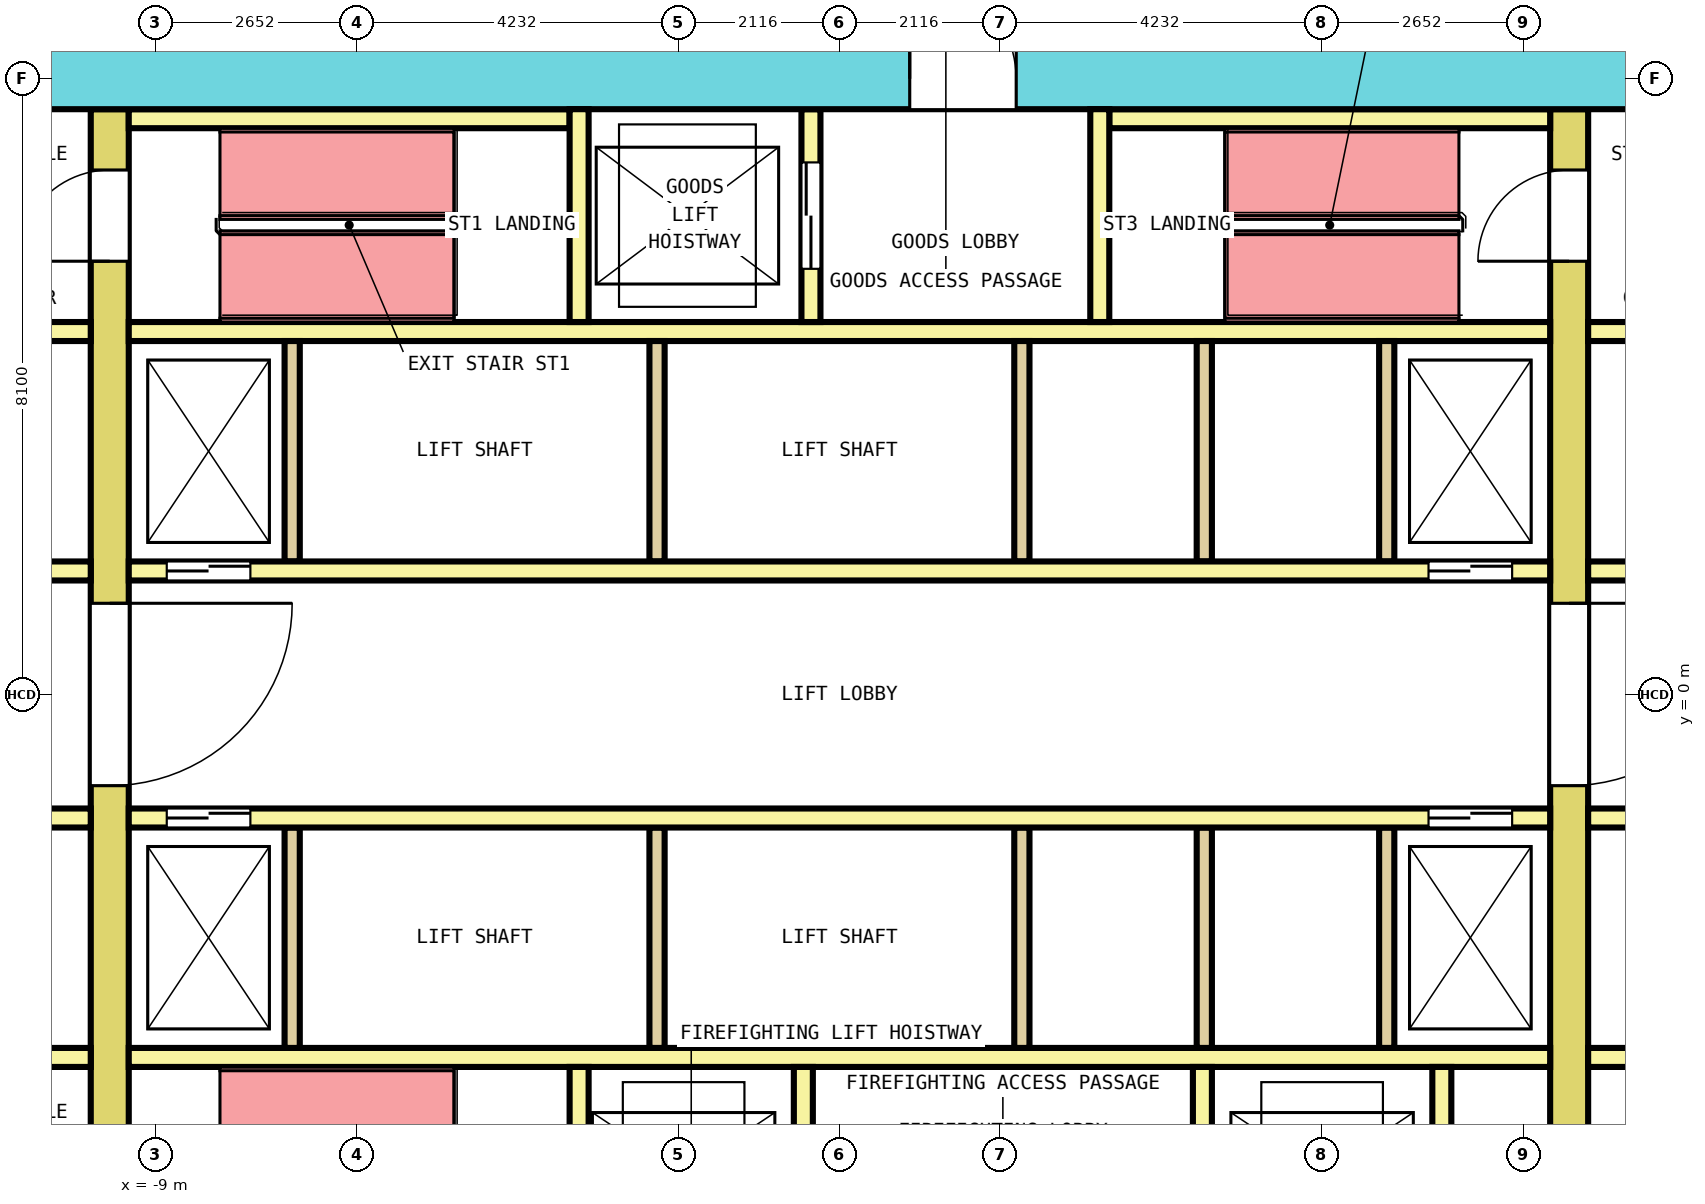
"""IFC4 building model, lengths in metres.
Left out: names, types, materials, properties, quantities, classifications, styles, units other than length and angle.
Written with IfcOpenShell. Run it as: python <this file> out.ifc"""

import sys

from ifc_helpers import new_model, si_unit, direction, frame, frame_2d, origin, place, context, subcontext, project, spatial, rectangle, extrude, element, fill, save


model = new_model("IFC4")
c1 = context("Model", 3, precision=1e-05, world=origin(), true_north=direction((0.0, 1.0)))
c2 = subcontext(c1, "Body", "Model", "MODEL_VIEW")
j1 = project(units=[si_unit("LENGTHUNIT", "METRE"), si_unit("PLANEANGLEUNIT", "RADIAN")], contexts=[c1])
p1 = place(None, origin())
s1 = spatial("IfcSite", under=j1, at=p1, CompositionType="ELEMENT")
p2 = place(p1, origin())
s2 = spatial("IfcBuilding", under=s1, at=p2, CompositionType="ELEMENT")
p3 = place(p2, frame((0.0, 0.0, 23.4)))
s3 = spatial("IfcBuildingStorey", under=s2, at=p3, CompositionType="ELEMENT", Elevation=23.4)
p4 = place(p3, frame((-12.75, 8.1, 0.0), z_axis=(0.0, 0.0, 1.0), x_axis=(1.0, 0.0, 0.0)))
e1 = element("IfcWall", 1, at=p4, inside=s3, PredefinedType="SHEAR", context=c2, shape_type="SweptSolid", body=[
    extrude(rectangle(XDim=25.5, YDim=0.8, at=frame_2d((12.75, 0.0))), origin(), (0.0, 0.0, 1.0), 4.1),
])
p5 = place(p4, frame((13.675, 0.0, 0.0)))
e2 = element("IfcOpeningElement", 2, at=p5, cuts=e1, PredefinedType="OPENING", context=c2, shape_type="SweptSolid", body=[
    extrude(rectangle(XDim=1.4, YDim=2.1, at=frame_2d((0.7, 1.05))), frame((0.0, 0.41, 0.0), z_axis=(0.0, -1.0, 0.0), x_axis=(1.0, 0.0, 0.0)), (0.0, 0.0, 1.0), 0.82),
])
p6 = place(p3, frame((-9.6, -7.7, 0.0), z_axis=(0.0, 0.0, 1.0), x_axis=(0.0, 1.0, 0.0)))
e3 = element("IfcWall", 3, at=p6, inside=s3, PredefinedType="SHEAR", context=c2, shape_type="SweptSolid", body=[
    extrude(rectangle(XDim=15.4, YDim=0.5, at=frame_2d((7.7, 0.0))), origin(), (0.0, 0.0, 1.0), 4.1),
])
p7 = place(p6, frame((6.5, 0.0, 0.0)))
e4 = element("IfcOpeningElement", 4, at=p7, cuts=e3, PredefinedType="OPENING", context=c2, shape_type="SweptSolid", body=[
    extrude(rectangle(XDim=2.4, YDim=2.1, at=frame_2d((1.2, 1.05))), frame((0.0, 0.26, 0.0), z_axis=(0.0, -1.0, 0.0), x_axis=(1.0, 0.0, 0.0)), (0.0, 0.0, 1.0), 0.52),
])
p8 = place(p6, frame((13.4, 0.0, 0.0)))
e5 = element("IfcOpeningElement", 5, at=p8, cuts=e3, PredefinedType="OPENING", context=c2, shape_type="SweptSolid", body=[
    extrude(rectangle(XDim=1.2, YDim=2.1, at=frame_2d((0.6, 1.05))), frame((0.0, 0.26, 0.0), z_axis=(0.0, -1.0, 0.0), x_axis=(1.0, 0.0, 0.0)), (0.0, 0.0, 1.0), 0.52),
])
p9 = place(p6, frame((0.8, 0.0, 0.0)))
e6 = element("IfcOpeningElement", 6, at=p9, cuts=e3, PredefinedType="OPENING", context=c2, shape_type="SweptSolid", body=[
    extrude(rectangle(XDim=1.2, YDim=2.1, at=frame_2d((0.6, 1.05))), frame((0.0, 0.26, 0.0), z_axis=(0.0, -1.0, 0.0), x_axis=(1.0, 0.0, 0.0)), (0.0, 0.0, 1.0), 0.52),
])
p10 = place(p3, frame((9.6, -7.7, 0.0), z_axis=(0.0, 0.0, 1.0), x_axis=(0.0, 1.0, 0.0)))
e7 = element("IfcWall", 7, at=p10, inside=s3, PredefinedType="SHEAR", context=c2, shape_type="SweptSolid", body=[
    extrude(rectangle(XDim=15.4, YDim=0.5, at=frame_2d((7.7, 0.0))), origin(), (0.0, 0.0, 1.0), 4.1),
])
p11 = place(p10, frame((6.5, 0.0, 0.0)))
e8 = element("IfcOpeningElement", 8, at=p11, cuts=e7, PredefinedType="OPENING", context=c2, shape_type="SweptSolid", body=[
    extrude(rectangle(XDim=2.4, YDim=2.1, at=frame_2d((1.2, 1.05))), frame((0.0, 0.26, 0.0), z_axis=(0.0, -1.0, 0.0), x_axis=(1.0, 0.0, 0.0)), (0.0, 0.0, 1.0), 0.52),
])
p12 = place(p10, frame((13.4, 0.0, 0.0)))
e9 = element("IfcOpeningElement", 9, at=p12, cuts=e7, PredefinedType="OPENING", context=c2, shape_type="SweptSolid", body=[
    extrude(rectangle(XDim=1.2, YDim=2.1, at=frame_2d((0.6, 1.05))), frame((0.0, 0.26, 0.0), z_axis=(0.0, -1.0, 0.0), x_axis=(1.0, 0.0, 0.0)), (0.0, 0.0, 1.0), 0.52),
])
p13 = place(p10, frame((0.9, 0.0, 0.0)))
e10 = element("IfcOpeningElement", 10, at=p13, cuts=e7, PredefinedType="OPENING", context=c2, shape_type="SweptSolid", body=[
    extrude(rectangle(XDim=1.0, YDim=2.1, at=frame_2d((0.5, 1.05))), frame((0.0, 0.26, 0.0), z_axis=(0.0, -1.0, 0.0), x_axis=(1.0, 0.0, 0.0)), (0.0, 0.0, 1.0), 0.52),
])
p14 = place(p3, frame((-12.75, 1.625, 0.0), z_axis=(0.0, 0.0, 1.0), x_axis=(1.0, 0.0, 0.0)))
e11 = element("IfcWall", 11, at=p14, inside=s3, PredefinedType="SOLIDWALL", context=c2, shape_type="SweptSolid", body=[
    extrude(rectangle(XDim=2.9, YDim=0.25, at=frame_2d((1.45, 0.0))), origin(), (0.0, 0.0, 1.0), 4.1),
])
p15 = place(p14, frame((0.9, 0.0, 0.0)))
e12 = element("IfcOpeningElement", 12, at=p15, cuts=e11, PredefinedType="OPENING", context=c2, shape_type="SweptSolid", body=[
    extrude(rectangle(XDim=1.1, YDim=2.1, at=frame_2d((0.55, 1.05))), frame((0.0, 0.135, 0.0), z_axis=(0.0, -1.0, 0.0), x_axis=(1.0, 0.0, 0.0)), (0.0, 0.0, 1.0), 0.27),
])
p16 = place(p3, frame((-9.35, 1.625, 0.0), z_axis=(0.0, 0.0, 1.0), x_axis=(1.0, 0.0, 0.0)))
e13 = element("IfcWall", 13, at=p16, inside=s3, PredefinedType="SOLIDWALL", context=c2, shape_type="SweptSolid", body=[
    extrude(rectangle(XDim=18.7, YDim=0.25, at=frame_2d((9.35, 0.0))), origin(), (0.0, 0.0, 1.0), 4.1),
])
p17 = place(p16, frame((0.5, 0.0, 0.0)))
e14 = element("IfcOpeningElement", 14, at=p17, cuts=e13, PredefinedType="OPENING", context=c2, shape_type="SweptSolid", body=[
    extrude(rectangle(XDim=1.1, YDim=2.1, at=frame_2d((0.55, 1.05))), frame((0.0, 0.135, 0.0), z_axis=(0.0, -1.0, 0.0), x_axis=(1.0, 0.0, 0.0)), (0.0, 0.0, 1.0), 0.27),
])
p18 = place(p16, frame((17.1, 0.0, 0.0)))
e15 = element("IfcOpeningElement", 15, at=p18, cuts=e13, PredefinedType="OPENING", context=c2, shape_type="SweptSolid", body=[
    extrude(rectangle(XDim=1.1, YDim=2.1, at=frame_2d((0.55, 1.05))), frame((0.0, 0.135, 0.0), z_axis=(0.0, -1.0, 0.0), x_axis=(1.0, 0.0, 0.0)), (0.0, 0.0, 1.0), 0.27),
])
p19 = place(p3, frame((9.85, 1.625, 0.0), z_axis=(0.0, 0.0, 1.0), x_axis=(1.0, 0.0, 0.0)))
e16 = element("IfcWall", 16, at=p19, inside=s3, PredefinedType="SOLIDWALL", context=c2, shape_type="SweptSolid", body=[
    extrude(rectangle(XDim=2.9, YDim=0.25, at=frame_2d((1.45, 0.0))), origin(), (0.0, 0.0, 1.0), 4.1),
])
p20 = place(p19, frame((0.9, 0.0, 0.0)))
e17 = element("IfcOpeningElement", 17, at=p20, cuts=e16, PredefinedType="OPENING", context=c2, shape_type="SweptSolid", body=[
    extrude(rectangle(XDim=1.1, YDim=2.1, at=frame_2d((0.55, 1.05))), frame((0.0, 0.135, 0.0), z_axis=(0.0, -1.0, 0.0), x_axis=(1.0, 0.0, 0.0)), (0.0, 0.0, 1.0), 0.27),
])
p21 = place(p3, frame((-12.75, 4.775, 0.0), z_axis=(0.0, 0.0, 1.0), x_axis=(1.0, 0.0, 0.0)))
e18 = element("IfcWall", 18, at=p21, inside=s3, PredefinedType="SOLIDWALL", context=c2, shape_type="SweptSolid", body=[
    extrude(rectangle(XDim=2.9, YDim=0.25, at=frame_2d((1.45, 0.0))), origin(), (0.0, 0.0, 1.0), 4.1),
])
p22 = place(p3, frame((-9.35, 4.775, 0.0), z_axis=(0.0, 0.0, 1.0), x_axis=(1.0, 0.0, 0.0)))
e19 = element("IfcWall", 19, at=p22, inside=s3, PredefinedType="SOLIDWALL", context=c2, shape_type="SweptSolid", body=[
    extrude(rectangle(XDim=18.7, YDim=0.25, at=frame_2d((9.35, 0.0))), origin(), (0.0, 0.0, 1.0), 4.1),
])
p23 = place(p3, frame((9.85, 4.775, 0.0), z_axis=(0.0, 0.0, 1.0), x_axis=(1.0, 0.0, 0.0)))
e20 = element("IfcWall", 20, at=p23, inside=s3, PredefinedType="SOLIDWALL", context=c2, shape_type="SweptSolid", body=[
    extrude(rectangle(XDim=2.9, YDim=0.25, at=frame_2d((1.45, 0.0))), origin(), (0.0, 0.0, 1.0), 4.1),
])
for number, where, z_axis, x_axis in (
    (21, (-7.2, 1.75, 0.0), (0.0, 0.0, 1.0), (0.0, 1.0, 0.0)),
    (22, (-2.4, 1.75, 0.0), (0.0, 0.0, 1.0), (0.0, 1.0, 0.0)),
    (23, (2.4, 1.75, 0.0), (0.0, 0.0, 1.0), (0.0, 1.0, 0.0)),
    (24, (4.8, 1.75, 0.0), (0.0, 0.0, 1.0), (0.0, 1.0, 0.0)),
    (25, (7.2, 1.75, 0.0), (0.0, 0.0, 1.0), (0.0, 1.0, 0.0)),
):
    element("IfcWall", number, at=place(p3, frame(where, z_axis=z_axis, x_axis=x_axis)), inside=s3, PredefinedType="SOLIDWALL", context=c2, shape_type="SweptSolid", body=[
        extrude(rectangle(XDim=2.9, YDim=0.2, at=frame_2d((1.45, 0.0))), origin(), (0.0, 0.0, 1.0), 4.1),
    ])
p24 = place(p3, frame((-12.75, -1.625, 0.0), z_axis=(0.0, 0.0, 1.0), x_axis=(1.0, 0.0, 0.0)))
e26 = element("IfcWall", 26, at=p24, inside=s3, PredefinedType="SOLIDWALL", context=c2, shape_type="SweptSolid", body=[
    extrude(rectangle(XDim=2.9, YDim=0.25, at=frame_2d((1.45, 0.0))), origin(), (0.0, 0.0, 1.0), 4.1),
])
p25 = place(p24, frame((0.9, 0.0, 0.0)))
e27 = element("IfcOpeningElement", 27, at=p25, cuts=e26, PredefinedType="OPENING", context=c2, shape_type="SweptSolid", body=[
    extrude(rectangle(XDim=1.1, YDim=2.1, at=frame_2d((0.55, 1.05))), frame((0.0, 0.135, 0.0), z_axis=(0.0, -1.0, 0.0), x_axis=(1.0, 0.0, 0.0)), (0.0, 0.0, 1.0), 0.27),
])
p26 = place(p3, frame((-9.35, -1.625, 0.0), z_axis=(0.0, 0.0, 1.0), x_axis=(1.0, 0.0, 0.0)))
e28 = element("IfcWall", 28, at=p26, inside=s3, PredefinedType="SOLIDWALL", context=c2, shape_type="SweptSolid", body=[
    extrude(rectangle(XDim=18.7, YDim=0.25, at=frame_2d((9.35, 0.0))), origin(), (0.0, 0.0, 1.0), 4.1),
])
p27 = place(p26, frame((0.5, 0.0, 0.0)))
e29 = element("IfcOpeningElement", 29, at=p27, cuts=e28, PredefinedType="OPENING", context=c2, shape_type="SweptSolid", body=[
    extrude(rectangle(XDim=1.1, YDim=2.1, at=frame_2d((0.55, 1.05))), frame((0.0, 0.135, 0.0), z_axis=(0.0, -1.0, 0.0), x_axis=(1.0, 0.0, 0.0)), (0.0, 0.0, 1.0), 0.27),
])
p28 = place(p26, frame((17.1, 0.0, 0.0)))
e30 = element("IfcOpeningElement", 30, at=p28, cuts=e28, PredefinedType="OPENING", context=c2, shape_type="SweptSolid", body=[
    extrude(rectangle(XDim=1.1, YDim=2.1, at=frame_2d((0.55, 1.05))), frame((0.0, 0.135, 0.0), z_axis=(0.0, -1.0, 0.0), x_axis=(1.0, 0.0, 0.0)), (0.0, 0.0, 1.0), 0.27),
])
p29 = place(p3, frame((9.85, -1.625, 0.0), z_axis=(0.0, 0.0, 1.0), x_axis=(1.0, 0.0, 0.0)))
e31 = element("IfcWall", 31, at=p29, inside=s3, PredefinedType="SOLIDWALL", context=c2, shape_type="SweptSolid", body=[
    extrude(rectangle(XDim=2.9, YDim=0.25, at=frame_2d((1.45, 0.0))), origin(), (0.0, 0.0, 1.0), 4.1),
])
p30 = place(p29, frame((0.9, 0.0, 0.0)))
e32 = element("IfcOpeningElement", 32, at=p30, cuts=e31, PredefinedType="OPENING", context=c2, shape_type="SweptSolid", body=[
    extrude(rectangle(XDim=1.1, YDim=2.1, at=frame_2d((0.55, 1.05))), frame((0.0, 0.135, 0.0), z_axis=(0.0, -1.0, 0.0), x_axis=(1.0, 0.0, 0.0)), (0.0, 0.0, 1.0), 0.27),
])
p31 = place(p3, frame((-12.75, -4.775, 0.0), z_axis=(0.0, 0.0, 1.0), x_axis=(1.0, 0.0, 0.0)))
e33 = element("IfcWall", 33, at=p31, inside=s3, PredefinedType="SOLIDWALL", context=c2, shape_type="SweptSolid", body=[
    extrude(rectangle(XDim=2.9, YDim=0.25, at=frame_2d((1.45, 0.0))), origin(), (0.0, 0.0, 1.0), 4.1),
])
p32 = place(p3, frame((-9.35, -4.775, 0.0), z_axis=(0.0, 0.0, 1.0), x_axis=(1.0, 0.0, 0.0)))
e34 = element("IfcWall", 34, at=p32, inside=s3, PredefinedType="SOLIDWALL", context=c2, shape_type="SweptSolid", body=[
    extrude(rectangle(XDim=18.7, YDim=0.25, at=frame_2d((9.35, 0.0))), origin(), (0.0, 0.0, 1.0), 4.1),
])
p33 = place(p3, frame((9.85, -4.775, 0.0), z_axis=(0.0, 0.0, 1.0), x_axis=(1.0, 0.0, 0.0)))
e35 = element("IfcWall", 35, at=p33, inside=s3, PredefinedType="SOLIDWALL", context=c2, shape_type="SweptSolid", body=[
    extrude(rectangle(XDim=2.9, YDim=0.25, at=frame_2d((1.45, 0.0))), origin(), (0.0, 0.0, 1.0), 4.1),
])
for number, where, z_axis, x_axis in (
    (36, (-7.2, -4.65, 0.0), (0.0, 0.0, 1.0), (0.0, 1.0, 0.0)),
    (37, (-2.4, -4.65, 0.0), (0.0, 0.0, 1.0), (0.0, 1.0, 0.0)),
    (38, (2.4, -4.65, 0.0), (0.0, 0.0, 1.0), (0.0, 1.0, 0.0)),
    (39, (4.8, -4.65, 0.0), (0.0, 0.0, 1.0), (0.0, 1.0, 0.0)),
    (40, (7.2, -4.65, 0.0), (0.0, 0.0, 1.0), (0.0, 1.0, 0.0)),
):
    element("IfcWall", number, at=place(p3, frame(where, z_axis=z_axis, x_axis=x_axis)), inside=s3, PredefinedType="SOLIDWALL", context=c2, shape_type="SweptSolid", body=[
        extrude(rectangle(XDim=2.9, YDim=0.2, at=frame_2d((1.45, 0.0))), origin(), (0.0, 0.0, 1.0), 4.1),
    ])
for number, where, z_axis, x_axis in (
    (41, (-9.35, 7.575, 0.0), (0.0, 0.0, 1.0), (1.0, 0.0, 0.0)),
    (42, (3.55, 7.575, 0.0), (0.0, 0.0, 1.0), (1.0, 0.0, 0.0)),
):
    element("IfcWall", number, at=place(p3, frame(where, z_axis=z_axis, x_axis=x_axis)), inside=s3, PredefinedType="SOLIDWALL", context=c2, shape_type="SweptSolid", body=[
        extrude(rectangle(XDim=5.8, YDim=0.25, at=frame_2d((2.9, 0.0))), origin(), (0.0, 0.0, 1.0), 4.1),
    ])
p34 = place(p3, frame((-3.425, 4.9, 0.0), z_axis=(0.0, 0.0, 1.0), x_axis=(0.0, 1.0, 0.0)))
e43 = element("IfcWall", 43, at=p34, inside=s3, PredefinedType="SOLIDWALL", context=c2, shape_type="SweptSolid", body=[
    extrude(rectangle(XDim=2.8, YDim=0.25, at=frame_2d((1.4, 0.0))), origin(), (0.0, 0.0, 1.0), 4.1),
])
p35 = place(p3, frame((-0.375, 4.9, 0.0), z_axis=(0.0, 0.0, 1.0), x_axis=(0.0, 1.0, 0.0)))
e44 = element("IfcWall", 44, at=p35, inside=s3, PredefinedType="SOLIDWALL", context=c2, shape_type="SweptSolid", body=[
    extrude(rectangle(XDim=2.8, YDim=0.25, at=frame_2d((1.4, 0.0))), origin(), (0.0, 0.0, 1.0), 4.1),
])
p36 = place(p35, frame((0.7, 0.0, 0.0)))
e45 = element("IfcOpeningElement", 45, at=p36, cuts=e44, PredefinedType="OPENING", context=c2, shape_type="SweptSolid", body=[
    extrude(rectangle(XDim=1.4, YDim=2.1, at=frame_2d((0.7, 1.05))), frame((0.0, 0.135, 0.0), z_axis=(0.0, -1.0, 0.0), x_axis=(1.0, 0.0, 0.0)), (0.0, 0.0, 1.0), 0.27),
])
for number, where, z_axis, x_axis in (
    (46, (3.425, 4.9, 0.0), (0.0, 0.0, 1.0), (0.0, 1.0, 0.0)),
    (47, (-3.425, -7.7, 0.0), (0.0, 0.0, 1.0), (0.0, 1.0, 0.0)),
):
    element("IfcWall", number, at=place(p3, frame(where, z_axis=z_axis, x_axis=x_axis)), inside=s3, PredefinedType="SOLIDWALL", context=c2, shape_type="SweptSolid", body=[
        extrude(rectangle(XDim=2.8, YDim=0.25, at=frame_2d((1.4, 0.0))), origin(), (0.0, 0.0, 1.0), 4.1),
    ])
p37 = place(p3, frame((-0.475, -7.7, 0.0), z_axis=(0.0, 0.0, 1.0), x_axis=(0.0, 1.0, 0.0)))
e48 = element("IfcWall", 48, at=p37, inside=s3, PredefinedType="SOLIDWALL", context=c2, shape_type="SweptSolid", body=[
    extrude(rectangle(XDim=2.8, YDim=0.25, at=frame_2d((1.4, 0.0))), origin(), (0.0, 0.0, 1.0), 4.1),
])
p38 = place(p37, frame((0.85, 0.0, 0.0)))
e49 = element("IfcOpeningElement", 49, at=p38, cuts=e48, PredefinedType="OPENING", context=c2, shape_type="SweptSolid", body=[
    extrude(rectangle(XDim=1.1, YDim=2.1, at=frame_2d((0.55, 1.05))), frame((0.0, 0.135, 0.0), z_axis=(0.0, -1.0, 0.0), x_axis=(1.0, 0.0, 0.0)), (0.0, 0.0, 1.0), 0.27),
])
p39 = place(p3, frame((4.775, -7.7, 0.0), z_axis=(0.0, 0.0, 1.0), x_axis=(0.0, 1.0, 0.0)))
e50 = element("IfcWall", 50, at=p39, inside=s3, PredefinedType="SOLIDWALL", context=c2, shape_type="SweptSolid", body=[
    extrude(rectangle(XDim=2.8, YDim=0.25, at=frame_2d((1.4, 0.0))), origin(), (0.0, 0.0, 1.0), 4.1),
])
p40 = place(p39, frame((0.85, 0.0, 0.0)))
e51 = element("IfcOpeningElement", 51, at=p40, cuts=e50, PredefinedType="OPENING", context=c2, shape_type="SweptSolid", body=[
    extrude(rectangle(XDim=1.1, YDim=2.1, at=frame_2d((0.55, 1.05))), frame((0.0, 0.135, 0.0), z_axis=(0.0, -1.0, 0.0), x_axis=(1.0, 0.0, 0.0)), (0.0, 0.0, 1.0), 0.27),
])
p41 = place(p3, frame((7.925, -7.7, 0.0), z_axis=(0.0, 0.0, 1.0), x_axis=(0.0, 1.0, 0.0)))
e52 = element("IfcWall", 52, at=p41, inside=s3, PredefinedType="SOLIDWALL", context=c2, shape_type="SweptSolid", body=[
    extrude(rectangle(XDim=2.8, YDim=0.25, at=frame_2d((1.4, 0.0))), origin(), (0.0, 0.0, 1.0), 4.1),
])
p42 = place(p17, origin())
e53 = element("IfcDoor", 53, at=p42, inside=s3, OperationType="DOUBLE_DOOR_SLIDING", PredefinedType="DOOR", context=c2, shape_type="SweptSolid", body=[
    extrude(rectangle(XDim=1.1, YDim=2.1, at=frame_2d((0.55, 1.05))), frame((0.0, 0.075, 0.0), z_axis=(0.0, -1.0, 0.0), x_axis=(1.0, 0.0, 0.0)), (0.0, 0.0, 1.0), 0.15),
])
fill(e14, e53)
p43 = place(p18, origin())
e54 = element("IfcDoor", 54, at=p43, inside=s3, OperationType="DOUBLE_DOOR_SLIDING", PredefinedType="DOOR", context=c2, shape_type="SweptSolid", body=[
    extrude(rectangle(XDim=1.1, YDim=2.1, at=frame_2d((0.55, 1.05))), frame((0.0, 0.075, 0.0), z_axis=(0.0, -1.0, 0.0), x_axis=(1.0, 0.0, 0.0)), (0.0, 0.0, 1.0), 0.15),
])
fill(e15, e54)
p44 = place(p27, origin())
e55 = element("IfcDoor", 55, at=p44, inside=s3, OperationType="DOUBLE_DOOR_SLIDING", PredefinedType="DOOR", context=c2, shape_type="SweptSolid", body=[
    extrude(rectangle(XDim=1.1, YDim=2.1, at=frame_2d((0.55, 1.05))), frame((0.0, 0.075, 0.0), z_axis=(0.0, -1.0, 0.0), x_axis=(1.0, 0.0, 0.0)), (0.0, 0.0, 1.0), 0.15),
])
fill(e29, e55)
p45 = place(p28, origin())
e56 = element("IfcDoor", 56, at=p45, inside=s3, OperationType="DOUBLE_DOOR_SLIDING", PredefinedType="DOOR", context=c2, shape_type="SweptSolid", body=[
    extrude(rectangle(XDim=1.1, YDim=2.1, at=frame_2d((0.55, 1.05))), frame((0.0, 0.075, 0.0), z_axis=(0.0, -1.0, 0.0), x_axis=(1.0, 0.0, 0.0)), (0.0, 0.0, 1.0), 0.15),
])
fill(e30, e56)
p46 = place(p36, origin())
e57 = element("IfcDoor", 57, at=p46, inside=s3, OperationType="DOUBLE_DOOR_SLIDING", PredefinedType="DOOR", context=c2, shape_type="SweptSolid", body=[
    extrude(rectangle(XDim=1.4, YDim=2.1, at=frame_2d((0.7, 1.05))), frame((0.0, 0.075, 0.0), z_axis=(0.0, -1.0, 0.0), x_axis=(1.0, 0.0, 0.0)), (0.0, 0.0, 1.0), 0.15),
])
fill(e45, e57)
p47 = place(p7, origin())
e58 = element("IfcDoor", 58, at=p47, inside=s3, OperationType="DOUBLE_DOOR_SINGLE_SWING", PredefinedType="DOOR", context=c2, shape_type="SweptSolid", body=[
    extrude(rectangle(XDim=2.4, YDim=2.1, at=frame_2d((1.2, 1.05))), frame((0.0, 0.2, 0.0), z_axis=(0.0, -1.0, 0.0), x_axis=(1.0, 0.0, 0.0)), (0.0, 0.0, 1.0), 0.4),
])
fill(e4, e58)
p48 = place(p11, origin())
e59 = element("IfcDoor", 59, at=p48, inside=s3, OperationType="DOUBLE_DOOR_SINGLE_SWING", PredefinedType="DOOR", context=c2, shape_type="SweptSolid", body=[
    extrude(rectangle(XDim=2.4, YDim=2.1, at=frame_2d((1.2, 1.05))), frame((0.0, 0.2, 0.0), z_axis=(0.0, -1.0, 0.0), x_axis=(1.0, 0.0, 0.0)), (0.0, 0.0, 1.0), 0.4),
])
fill(e8, e59)
p49 = place(p8, origin())
e60 = element("IfcDoor", 60, at=p49, inside=s3, OperationType="SINGLE_SWING_LEFT", PredefinedType="DOOR", context=c2, shape_type="SweptSolid", body=[
    extrude(rectangle(XDim=1.2, YDim=2.1, at=frame_2d((0.6, 1.05))), frame((0.0, 0.2, 0.0), z_axis=(0.0, -1.0, 0.0), x_axis=(1.0, 0.0, 0.0)), (0.0, 0.0, 1.0), 0.4),
])
fill(e5, e60)
p50 = place(p12, origin())
e61 = element("IfcDoor", 61, at=p50, inside=s3, OperationType="SINGLE_SWING_LEFT", PredefinedType="DOOR", context=c2, shape_type="SweptSolid", body=[
    extrude(rectangle(XDim=1.2, YDim=2.1, at=frame_2d((0.6, 1.05))), frame((0.0, 0.2, 0.0), z_axis=(0.0, -1.0, 0.0), x_axis=(1.0, 0.0, 0.0)), (0.0, 0.0, 1.0), 0.4),
])
fill(e9, e61)
p51 = place(p5, origin())
e62 = element("IfcDoor", 62, at=p51, inside=s3, OperationType="DOUBLE_DOOR_SINGLE_SWING", PredefinedType="DOOR", context=c2, shape_type="SweptSolid", body=[
    extrude(rectangle(XDim=1.4, YDim=2.1, at=frame_2d((0.7, 1.05))), frame((0.0, 0.3, 0.0), z_axis=(0.0, -1.0, 0.0), x_axis=(1.0, 0.0, 0.0)), (0.0, 0.0, 1.0), 0.6),
])
fill(e2, e62)
save(model, sys.argv[1])
